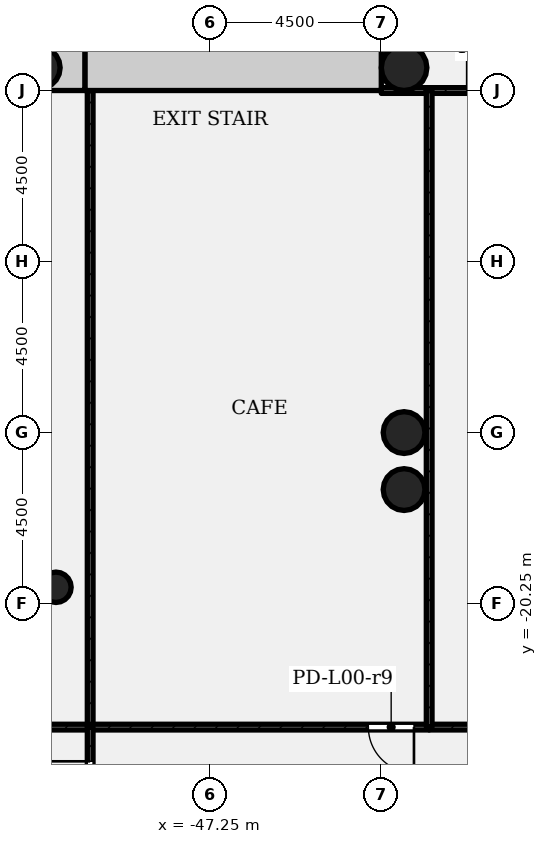
"""IFC4 building model, lengths in metres.
Left out: names, types, materials, properties, quantities, classifications, styles, units other than length and angle.
Written with IfcOpenShell. Run it as: python <this file> out.ifc"""

import sys

from ifc_helpers import new_model, si_unit, direction, frame, frame_2d, origin, origin_2d, place, context, subcontext, project, spatial, rectangle, hollow_circle, extrude, element, fill, save


model = new_model("IFC4")
c1 = context("Model", 3, precision=1e-05, world=origin(), true_north=direction((0.0, 1.0)))
c2 = subcontext(c1, "Body", "Model", "MODEL_VIEW")
j1 = project(units=[si_unit("LENGTHUNIT", "METRE"), si_unit("PLANEANGLEUNIT", "RADIAN")], contexts=[c1])
p1 = place(None, origin())
s1 = spatial("IfcSite", under=j1, at=p1, CompositionType="ELEMENT")
p2 = place(p1, origin())
s2 = spatial("IfcBuilding", under=s1, at=p2, CompositionType="ELEMENT")
p3 = place(p2, origin())
s3 = spatial("IfcBuildingStorey", under=s2, at=p3, CompositionType="ELEMENT", Elevation=0.0)
p4 = place(p3, frame((-50.55, -6.15, -0.4), z_axis=(0.0, 0.0, 1.0), x_axis=(1.0, 0.0, 0.0)))
e1 = element("IfcWall", 1, at=p4, inside=s3, PredefinedType="SHEAR", context=c2, shape_type="SweptSolid", body=[
    extrude(rectangle(XDim=7.8, YDim=1.2, at=frame_2d((3.9, 0.0))), origin(), (0.0, 0.0, 1.0), 6.4),
])
p5 = place(p3, frame((-51.15, 5.55, -0.4), z_axis=(0.0, 0.0, 1.0), x_axis=(0.0, -1.0, 0.0)))
e2 = element("IfcWall", 2, at=p5, inside=s3, PredefinedType="SHEAR", context=c2, shape_type="SweptSolid", body=[
    extrude(rectangle(XDim=12.3, YDim=1.2, at=frame_2d((6.15, 0.0))), origin(), (0.0, 0.0, 1.0), 6.4),
])
p6 = place(p5, frame((4.65, 0.0, 0.4)))
e3 = element("IfcOpeningElement", 3, at=p6, cuts=e2, PredefinedType="OPENING", context=c2, shape_type="SweptSolid", body=[
    extrude(rectangle(XDim=1.8, YDim=2.1, at=frame_2d((0.9, 1.05))), frame((0.0, 0.61, 0.0), z_axis=(0.0, -1.0, 0.0), x_axis=(1.0, 0.0, 0.0)), (0.0, 0.0, 1.0), 1.22),
])
for number, where, z_axis, x_axis in (
    (4, (-51.75, -6.15, -0.4), (0.0, 0.0, 1.0), (1.0, 0.0, 0.0)),
    (5, (-42.15, -15.75, -0.4), (0.0, 0.0, 1.0), (1.0, 0.0, 0.0)),
    (6, (-42.15, -17.25, -0.4), (0.0, 0.0, 1.0), (1.0, 0.0, 0.0)),
):
    element("IfcColumn", number, at=place(p3, frame(where, z_axis=z_axis, x_axis=x_axis)), inside=s3, PredefinedType="COLUMN", context=c2, shape_type="SweptSolid", body=[
        extrude(hollow_circle(Radius=0.55, WallThickness=0.04, at=origin_2d()), origin(), (0.0, 0.0, 1.0), 6.4),
    ])
p7 = place(p3, frame((-42.15, -6.15, -0.4), z_axis=(0.0, 0.0, 1.0), x_axis=(1.0, 0.0, 0.0)))
e7 = element("IfcColumn", 7, at=p7, inside=s3, PredefinedType="COLUMN", context=c2, shape_type="SweptSolid", body=[
    extrude(hollow_circle(Radius=0.6, WallThickness=0.045, at=origin_2d()), origin(), (0.0, 0.0, 1.0), 6.4),
])
p8 = place(p3, frame((-51.31, -19.821, -0.4), z_axis=(0.0, 0.0, 1.0), x_axis=(1.0, 0.0, 0.0)))
e8 = element("IfcColumn", 8, at=p8, inside=s3, PredefinedType="COLUMN", context=c2, shape_type="SweptSolid", body=[
    extrude(hollow_circle(Radius=0.4, WallThickness=0.028, at=origin_2d()), origin(), (0.0, 0.0, 1.0), 6.4),
])
p9 = place(p3, frame((-50.41, -23.5, 0.0), z_axis=(0.0, 0.0, 1.0), x_axis=(-1.0, 0.0, 0.0)))
e9 = element("IfcWall", 9, at=p9, inside=s3, PredefinedType="PARTITIONING", context=c2, shape_type="SweptSolid", body=[
    extrude(rectangle(XDim=1.96, YDim=0.15, at=frame_2d((0.98, 0.0))), origin(), (0.0, 0.0, 1.0), 5.58),
])
p10 = place(p3, frame((-50.41, -6.75, 0.0), z_axis=(0.0, 0.0, 1.0), x_axis=(0.0, -1.0, 0.0)))
e10 = element("IfcWall", 10, at=p10, inside=s3, PredefinedType="PARTITIONING", context=c2, shape_type="SweptSolid", body=[
    extrude(rectangle(XDim=16.75, YDim=0.15, at=frame_2d((8.375, 0.0))), origin(), (0.0, 0.0, 1.0), 5.58),
])
p11 = place(p3, frame((-42.75, -6.75, 0.0), z_axis=(0.0, 0.0, 1.0), x_axis=(1.0, 0.0, 0.0)))
e11 = element("IfcWall", 11, at=p11, inside=s3, PredefinedType="PARTITIONING", context=c2, shape_type="SweptSolid", body=[
    extrude(rectangle(XDim=1.26, YDim=0.15, at=frame_2d((0.63, 0.0))), origin(), (0.0, 0.0, 1.0), 5.58),
])
p12 = place(p3, frame((-41.49, -23.5, 0.0), z_axis=(0.0, 0.0, 1.0), x_axis=(-1.0, 0.0, 0.0)))
e12 = element("IfcWall", 12, at=p12, inside=s3, PredefinedType="PARTITIONING", context=c2, shape_type="SweptSolid", body=[
    extrude(rectangle(XDim=8.92, YDim=0.15, at=frame_2d((4.46, 0.0))), origin(), (0.0, 0.0, 1.0), 5.58),
])
p13 = place(p12, frame((0.4, 0.0, 0.0)))
e13 = element("IfcOpeningElement", 13, at=p13, cuts=e12, PredefinedType="OPENING", context=c2, shape_type="SweptSolid", body=[
    extrude(rectangle(XDim=1.2, YDim=2.1, at=frame_2d((0.6, 1.05))), frame((0.0, 0.085, 0.0), z_axis=(0.0, -1.0, 0.0), x_axis=(1.0, 0.0, 0.0)), (0.0, 0.0, 1.0), 0.17),
])
p14 = place(p3, frame((-41.49, -6.75, 0.0), z_axis=(0.0, 0.0, 1.0), x_axis=(1.0, 0.0, 0.0)))
e14 = element("IfcWall", 14, at=p14, inside=s3, PredefinedType="PARTITIONING", context=c2, shape_type="SweptSolid", body=[
    extrude(rectangle(XDim=8.92, YDim=0.15, at=frame_2d((4.46, 0.0))), origin(), (0.0, 0.0, 1.0), 5.58),
])
p15 = place(p14, frame((1.0, 0.0, 0.0)))
e15 = element("IfcOpeningElement", 15, at=p15, cuts=e14, PredefinedType="OPENING", context=c2, shape_type="SweptSolid", body=[
    extrude(rectangle(XDim=1.2, YDim=2.1, at=frame_2d((0.6, 1.05))), frame((0.0, 0.085, 0.0), z_axis=(0.0, -1.0, 0.0), x_axis=(1.0, 0.0, 0.0)), (0.0, 0.0, 1.0), 0.17),
])
p16 = place(p3, frame((-32.57, -23.5, 0.0), z_axis=(0.0, 0.0, 1.0), x_axis=(-1.0, 0.0, 0.0)))
e16 = element("IfcWall", 16, at=p16, inside=s3, PredefinedType="PARTITIONING", context=c2, shape_type="SweptSolid", body=[
    extrude(rectangle(XDim=8.92, YDim=0.15, at=frame_2d((4.46, 0.0))), origin(), (0.0, 0.0, 1.0), 5.58),
])
p17 = place(p3, frame((-41.49, -23.5, 0.0), z_axis=(0.0, 0.0, 1.0), x_axis=(0.0, 1.0, 0.0)))
e17 = element("IfcWall", 17, at=p17, inside=s3, PredefinedType="PARTITIONING", context=c2, shape_type="SweptSolid", body=[
    extrude(rectangle(XDim=16.75, YDim=0.15, at=frame_2d((8.375, 0.0))), origin(), (0.0, 0.0, 1.0), 5.58),
])
p18 = place(p3, frame((-50.41, -26.5, 0.0), z_axis=(0.0, 0.0, 1.0), x_axis=(0.0, 1.0, 0.0)))
e18 = element("IfcWall", 18, at=p18, inside=s3, PredefinedType="PARTITIONING", context=c2, shape_type="SweptSolid", body=[
    extrude(rectangle(XDim=3.0, YDim=0.15, at=frame_2d((1.5, 0.0))), origin(), (0.0, 0.0, 1.0), 5.58),
])
p19 = place(p18, frame((0.9, 0.0, 0.0)))
e19 = element("IfcOpeningElement", 19, at=p19, cuts=e18, PredefinedType="OPENING", context=c2, shape_type="SweptSolid", body=[
    extrude(rectangle(XDim=1.2, YDim=2.1, at=frame_2d((0.6, 1.05))), frame((0.0, 0.085, 0.0), z_axis=(0.0, -1.0, 0.0), x_axis=(1.0, 0.0, 0.0)), (0.0, 0.0, 1.0), 0.17),
])
p20 = place(p13, origin())
e20 = element("IfcDoor", 20, at=p20, inside=s3, OperationType="SINGLE_SWING_RIGHT", PredefinedType="DOOR", context=c2, shape_type="SweptSolid", body=[
    extrude(rectangle(XDim=1.2, YDim=2.1, at=frame_2d((0.6, 1.05))), frame((0.0, 0.025, 0.0), z_axis=(0.0, -1.0, 0.0), x_axis=(1.0, 0.0, 0.0)), (0.0, 0.0, 1.0), 0.05),
])
fill(e13, e20)
p21 = place(p19, origin())
e21 = element("IfcDoor", 21, at=p21, inside=s3, OperationType="SINGLE_SWING_LEFT", PredefinedType="DOOR", context=c2, shape_type="SweptSolid", body=[
    extrude(rectangle(XDim=1.2, YDim=2.1, at=frame_2d((0.6, 1.05))), frame((0.0, 0.025, 0.0), z_axis=(0.0, -1.0, 0.0), x_axis=(1.0, 0.0, 0.0)), (0.0, 0.0, 1.0), 0.05),
])
fill(e19, e21)
save(model, sys.argv[1])
